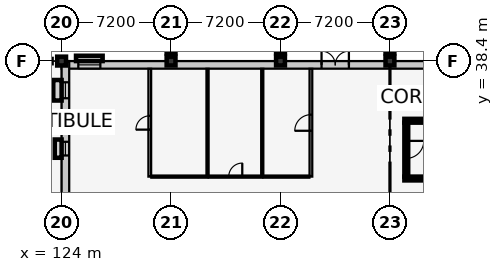
"""IFC4 building model, lengths in metres.
Left out: names, types, materials, properties, quantities, classifications, styles, units other than length and angle.
Written with IfcOpenShell. Run it as: python <this file> out.ifc"""

import sys

from ifc_helpers import new_model, si_unit, direction, frame, frame_2d, origin, origin_2d, place, context, subcontext, project, spatial, rectangle, extrude, element, fill, save


model = new_model("IFC4")
c1 = context("Model", 3, precision=1e-05, world=origin(), true_north=direction((0.0, 1.0)))
c2 = subcontext(c1, "Body", "Model", "MODEL_VIEW")
j1 = project(units=[si_unit("LENGTHUNIT", "METRE"), si_unit("PLANEANGLEUNIT", "RADIAN")], contexts=[c1])
p1 = place(None, origin())
s1 = spatial("IfcSite", under=j1, at=p1, CompositionType="ELEMENT")
p2 = place(p1, origin())
s2 = spatial("IfcBuilding", under=s1, at=p2, CompositionType="ELEMENT")
p3 = place(p2, origin())
s3 = spatial("IfcBuildingStorey", under=s2, at=p3, CompositionType="ELEMENT", Elevation=0.0)
for number, where, z_axis, x_axis in (
    (1, (124.0, 38.4, 0.0), (0.0, 0.0, 1.0), (1.0, 0.0, 0.0)),
    (2, (131.2, 38.4, 0.0), (0.0, 0.0, 1.0), (1.0, 0.0, 0.0)),
    (3, (138.4, 38.4, 0.0), (0.0, 0.0, 1.0), (1.0, 0.0, 0.0)),
    (4, (145.6, 38.4, 0.0), (0.0, 0.0, 1.0), (1.0, 0.0, 0.0)),
    (5, (131.2, 39.2, 0.0), (0.0, 0.0, 1.0), (1.0, 0.0, 0.0)),
    (6, (138.4, 39.2, 0.0), (0.0, 0.0, 1.0), (1.0, 0.0, 0.0)),
    (7, (145.6, 39.2, 0.0), (0.0, 0.0, 1.0), (1.0, 0.0, 0.0)),
):
    element("IfcColumn", number, at=place(p3, frame(where, z_axis=z_axis, x_axis=x_axis)), inside=s3, PredefinedType="COLUMN", context=c2, shape_type="SweptSolid", body=[
        extrude(rectangle(XDim=0.58, YDim=0.58, at=origin_2d()), origin(), (0.0, 0.0, 1.0), 5.4),
    ])
p4 = place(p3, frame((124.0, 38.15, 0.0), z_axis=(0.0, 0.0, 1.0), x_axis=(1.0, 0.0, 0.0)))
e8 = element("IfcWall", 8, at=p4, inside=s3, PredefinedType="SOLIDWALL", context=c2, shape_type="SweptSolid", body=[
    extrude(rectangle(XDim=62.0, YDim=0.5, at=frame_2d((31.0, 0.0))), origin(), (0.0, 0.0, 1.0), 4.275),
])
p5 = place(p4, frame((17.1, 0.0, 0.0)))
e9 = element("IfcOpeningElement", 9, at=p5, cuts=e8, PredefinedType="OPENING", context=c2, shape_type="SweptSolid", body=[
    extrude(rectangle(XDim=1.8, YDim=2.3, at=frame_2d((0.9, 1.15))), frame((0.0, 0.262, 0.0), z_axis=(0.0, -1.0, 0.0), x_axis=(1.0, 0.0, 0.0)), (0.0, 0.0, 1.0), 0.524),
])
p6 = place(p4, frame((1.098, 0.0, 0.9)))
e10 = element("IfcOpeningElement", 10, at=p6, cuts=e8, PredefinedType="OPENING", context=c2, shape_type="SweptSolid", body=[
    extrude(rectangle(XDim=1.45, YDim=1.45, at=frame_2d((0.725, 0.725))), frame((0.0, 0.262, 0.0), z_axis=(0.0, -1.0, 0.0), x_axis=(1.0, 0.0, 0.0)), (0.0, 0.0, 1.0), 0.524),
])
p7 = place(p4, frame((26.853, 0.0, 0.9)))
e11 = element("IfcOpeningElement", 11, at=p7, cuts=e8, PredefinedType="OPENING", context=c2, shape_type="SweptSolid", body=[
    extrude(rectangle(XDim=1.0, YDim=1.75, at=frame_2d((0.5, 0.875))), frame((0.0, 0.262, 0.0), z_axis=(0.0, -1.0, 0.0), x_axis=(1.0, 0.0, 0.0)), (0.0, 0.0, 1.0), 0.524),
])
p8 = place(p4, frame((37.624, 0.0, 0.9)))
e12 = element("IfcOpeningElement", 12, at=p8, cuts=e8, PredefinedType="OPENING", context=c2, shape_type="SweptSolid", body=[
    extrude(rectangle(XDim=1.34, YDim=1.75, at=frame_2d((0.67, 0.875))), frame((0.0, 0.262, 0.0), z_axis=(0.0, -1.0, 0.0), x_axis=(1.0, 0.0, 0.0)), (0.0, 0.0, 1.0), 0.524),
])
p9 = place(p4, frame((41.221, 0.0, 0.9)))
e13 = element("IfcOpeningElement", 13, at=p9, cuts=e8, PredefinedType="OPENING", context=c2, shape_type="SweptSolid", body=[
    extrude(rectangle(XDim=1.44, YDim=1.75, at=frame_2d((0.72, 0.875))), frame((0.0, 0.262, 0.0), z_axis=(0.0, -1.0, 0.0), x_axis=(1.0, 0.0, 0.0)), (0.0, 0.0, 1.0), 0.524),
])
p10 = place(p4, frame((48.785, 0.0, 0.9)))
e14 = element("IfcOpeningElement", 14, at=p10, cuts=e8, PredefinedType="OPENING", context=c2, shape_type="SweptSolid", body=[
    extrude(rectangle(XDim=0.9, YDim=1.35, at=frame_2d((0.45, 0.675))), frame((0.0, 0.262, 0.0), z_axis=(0.0, -1.0, 0.0), x_axis=(1.0, 0.0, 0.0)), (0.0, 0.0, 1.0), 0.524),
])
p11 = place(p4, frame((55.979, 0.0, 0.9)))
e15 = element("IfcOpeningElement", 15, at=p11, cuts=e8, PredefinedType="OPENING", context=c2, shape_type="SweptSolid", body=[
    extrude(rectangle(XDim=1.1, YDim=1.35, at=frame_2d((0.55, 0.675))), frame((0.0, 0.262, 0.0), z_axis=(0.0, -1.0, 0.0), x_axis=(1.0, 0.0, 0.0)), (0.0, 0.0, 1.0), 0.524),
])
p12 = place(p4, frame((59.576, 0.0, 0.9)))
e16 = element("IfcOpeningElement", 16, at=p12, cuts=e8, PredefinedType="OPENING", context=c2, shape_type="SweptSolid", body=[
    extrude(rectangle(XDim=1.2, YDim=1.35, at=frame_2d((0.6, 0.675))), frame((0.0, 0.262, 0.0), z_axis=(0.0, -1.0, 0.0), x_axis=(1.0, 0.0, 0.0)), (0.0, 0.0, 1.0), 0.524),
])
p13 = place(p3, frame((124.25, 0.0, 0.0), z_axis=(0.0, 0.0, 1.0), x_axis=(0.0, 1.0, 0.0)))
e17 = element("IfcWall", 17, at=p13, inside=s3, PredefinedType="SOLIDWALL", context=c2, shape_type="SweptSolid", body=[
    extrude(rectangle(XDim=38.4, YDim=0.5, at=frame_2d((19.2, 0.0))), origin(), (0.0, 0.0, 1.0), 4.275),
])
p14 = place(p13, frame((25.3, 0.0, 0.0)))
e18 = element("IfcOpeningElement", 18, at=p14, cuts=e17, PredefinedType="OPENING", context=c2, shape_type="SweptSolid", body=[
    extrude(rectangle(XDim=2.2, YDim=2.4, at=frame_2d((1.1, 1.2))), frame((0.0, 0.262, 0.0), z_axis=(0.0, -1.0, 0.0), x_axis=(1.0, 0.0, 0.0)), (0.0, 0.0, 1.0), 0.524),
])
p15 = place(p13, frame((1.27, 0.0, 0.9)))
e19 = element("IfcOpeningElement", 19, at=p15, cuts=e17, PredefinedType="OPENING", context=c2, shape_type="SweptSolid", body=[
    extrude(rectangle(XDim=1.3, YDim=1.35, at=frame_2d((0.65, 0.675))), frame((0.0, 0.262, 0.0), z_axis=(0.0, -1.0, 0.0), x_axis=(1.0, 0.0, 0.0)), (0.0, 0.0, 1.0), 0.524),
])
p16 = place(p13, frame((9.125, 0.0, 0.9)))
e20 = element("IfcOpeningElement", 20, at=p16, cuts=e17, PredefinedType="OPENING", context=c2, shape_type="SweptSolid", body=[
    extrude(rectangle(XDim=0.95, YDim=1.45, at=frame_2d((0.475, 0.725))), frame((0.0, 0.262, 0.0), z_axis=(0.0, -1.0, 0.0), x_axis=(1.0, 0.0, 0.0)), (0.0, 0.0, 1.0), 0.524),
])
p17 = place(p13, frame((16.705, 0.0, 0.9)))
e21 = element("IfcOpeningElement", 21, at=p17, cuts=e17, PredefinedType="OPENING", context=c2, shape_type="SweptSolid", body=[
    extrude(rectangle(XDim=1.15, YDim=1.45, at=frame_2d((0.575, 0.725))), frame((0.0, 0.262, 0.0), z_axis=(0.0, -1.0, 0.0), x_axis=(1.0, 0.0, 0.0)), (0.0, 0.0, 1.0), 0.524),
])
p18 = place(p13, frame((32.19, 0.0, 0.9)))
e22 = element("IfcOpeningElement", 22, at=p18, cuts=e17, PredefinedType="OPENING", context=c2, shape_type="SweptSolid", body=[
    extrude(rectangle(XDim=0.9, YDim=1.6, at=frame_2d((0.45, 0.8))), frame((0.0, 0.262, 0.0), z_axis=(0.0, -1.0, 0.0), x_axis=(1.0, 0.0, 0.0)), (0.0, 0.0, 1.0), 0.524),
])
p19 = place(p13, frame((35.955, 0.0, 0.9)))
e23 = element("IfcOpeningElement", 23, at=p19, cuts=e17, PredefinedType="OPENING", context=c2, shape_type="SweptSolid", body=[
    extrude(rectangle(XDim=1.05, YDim=1.6, at=frame_2d((0.525, 0.8))), frame((0.0, 0.262, 0.0), z_axis=(0.0, -1.0, 0.0), x_axis=(1.0, 0.0, 0.0)), (0.0, 0.0, 1.0), 0.524),
])
for number, where, z_axis, x_axis in (
    (24, (146.55, 30.675, 0.0), (0.0, 0.0, 1.0), (1.0, 0.0, 0.0)),
    (25, (155.45, 34.475, 0.0), (0.0, 0.0, 1.0), (-1.0, 0.0, 0.0)),
):
    element("IfcWall", number, at=place(p3, frame(where, z_axis=z_axis, x_axis=x_axis)), inside=s3, PredefinedType="SHEAR", context=c2, shape_type="SweptSolid", body=[
        extrude(rectangle(XDim=8.9, YDim=0.25, at=frame_2d((4.45, 0.0))), origin(), (0.0, 0.0, 1.0), 5.12),
    ])
p20 = place(p3, frame((146.675, 34.35, 0.0), z_axis=(0.0, 0.0, 1.0), x_axis=(0.0, -1.0, 0.0)))
e26 = element("IfcWall", 26, at=p20, inside=s3, PredefinedType="SHEAR", context=c2, shape_type="SweptSolid", body=[
    extrude(rectangle(XDim=3.55, YDim=0.25, at=frame_2d((1.775, 0.0))), origin(), (0.0, 0.0, 1.0), 5.12),
])
p21 = place(p20, frame((1.2, 0.0, 0.0)))
e27 = element("IfcOpeningElement", 27, at=p21, cuts=e26, PredefinedType="OPENING", context=c2, shape_type="SweptSolid", body=[
    extrude(rectangle(XDim=1.15, YDim=2.15, at=frame_2d((0.575, 1.075))), frame((0.0, 0.137, 0.0), z_axis=(0.0, -1.0, 0.0), x_axis=(1.0, 0.0, 0.0)), (0.0, 0.0, 1.0), 0.274),
])
p22 = place(p3, frame((140.4, 30.8, 0.0), z_axis=(0.0, 0.0, 1.0), x_axis=(0.0, 1.0, 0.0)))
e28 = element("IfcWall", 28, at=p22, inside=s3, PredefinedType="PARTITIONING", context=c2, shape_type="SweptSolid", body=[
    extrude(rectangle(XDim=7.09, YDim=0.18, at=frame_2d((3.545, 0.0))), origin(), (0.0, 0.0, 1.0), 5.12),
])
p23 = place(p22, frame((3.015, 0.0, 0.0)))
e29 = element("IfcOpeningElement", 29, at=p23, cuts=e28, PredefinedType="OPENING", context=c2, shape_type="SweptSolid", body=[
    extrude(rectangle(XDim=1.06, YDim=2.1, at=frame_2d((0.53, 1.05))), frame((0.0, 0.102, 0.0), z_axis=(0.0, -1.0, 0.0), x_axis=(1.0, 0.0, 0.0)), (0.0, 0.0, 1.0), 0.204),
])
p24 = place(p3, frame((129.8, 30.8, 0.0), z_axis=(0.0, 0.0, 1.0), x_axis=(0.0, 1.0, 0.0)))
e30 = element("IfcWall", 30, at=p24, inside=s3, PredefinedType="PARTITIONING", context=c2, shape_type="SweptSolid", body=[
    extrude(rectangle(XDim=7.09, YDim=0.18, at=frame_2d((3.545, 0.0))), origin(), (0.0, 0.0, 1.0), 5.12),
])
p25 = place(p24, frame((3.09, 0.0, 0.0)))
e31 = element("IfcOpeningElement", 31, at=p25, cuts=e30, PredefinedType="OPENING", context=c2, shape_type="SweptSolid", body=[
    extrude(rectangle(XDim=0.91, YDim=2.06, at=frame_2d((0.455, 1.03))), frame((0.0, 0.102, 0.0), z_axis=(0.0, -1.0, 0.0), x_axis=(1.0, 0.0, 0.0)), (0.0, 0.0, 1.0), 0.204),
])
p26 = place(p3, frame((129.9, 30.8, 0.0), z_axis=(0.0, 0.0, 1.0), x_axis=(1.0, 0.0, 0.0)))
e32 = element("IfcWall", 32, at=p26, inside=s3, PredefinedType="PARTITIONING", context=c2, shape_type="SweptSolid", body=[
    extrude(rectangle(XDim=3.7, YDim=0.14, at=frame_2d((1.85, 0.0))), origin(), (0.0, 0.0, 1.0), 5.12),
])
p27 = place(p3, frame((133.6, 30.88, 0.0), z_axis=(0.0, 0.0, 1.0), x_axis=(0.0, 1.0, 0.0)))
e33 = element("IfcWall", 33, at=p27, inside=s3, PredefinedType="PARTITIONING", context=c2, shape_type="SweptSolid", body=[
    extrude(rectangle(XDim=7.01, YDim=0.14, at=frame_2d((3.505, 0.0))), origin(), (0.0, 0.0, 1.0), 5.12),
])
p28 = place(p3, frame((133.68, 30.8, 0.0), z_axis=(0.0, 0.0, 1.0), x_axis=(1.0, 0.0, 0.0)))
e34 = element("IfcWall", 34, at=p28, inside=s3, PredefinedType="PARTITIONING", context=c2, shape_type="SweptSolid", body=[
    extrude(rectangle(XDim=3.52, YDim=0.14, at=frame_2d((1.76, 0.0))), origin(), (0.0, 0.0, 1.0), 5.12),
])
p29 = place(p28, frame((1.315, 0.0, 0.0)))
e35 = element("IfcOpeningElement", 35, at=p29, cuts=e34, PredefinedType="OPENING", context=c2, shape_type="SweptSolid", body=[
    extrude(rectangle(XDim=0.89, YDim=2.05, at=frame_2d((0.445, 1.025))), frame((0.0, 0.082, 0.0), z_axis=(0.0, -1.0, 0.0), x_axis=(1.0, 0.0, 0.0)), (0.0, 0.0, 1.0), 0.164),
])
p30 = place(p3, frame((137.2, 30.88, 0.0), z_axis=(0.0, 0.0, 1.0), x_axis=(0.0, 1.0, 0.0)))
e36 = element("IfcWall", 36, at=p30, inside=s3, PredefinedType="PARTITIONING", context=c2, shape_type="SweptSolid", body=[
    extrude(rectangle(XDim=7.01, YDim=0.14, at=frame_2d((3.505, 0.0))), origin(), (0.0, 0.0, 1.0), 5.12),
])
p31 = place(p3, frame((137.28, 30.8, 0.0), z_axis=(0.0, 0.0, 1.0), x_axis=(1.0, 0.0, 0.0)))
e37 = element("IfcWall", 37, at=p31, inside=s3, PredefinedType="PARTITIONING", context=c2, shape_type="SweptSolid", body=[
    extrude(rectangle(XDim=3.02, YDim=0.14, at=frame_2d((1.51, 0.0))), origin(), (0.0, 0.0, 1.0), 5.12),
])
p32 = place(p5, origin())
e38 = element("IfcDoor", 38, at=p32, inside=s3, OperationType="DOUBLE_DOOR_SINGLE_SWING", PredefinedType="DOOR", context=c2, shape_type="SweptSolid", body=[
    extrude(rectangle(XDim=1.8, YDim=2.3, at=frame_2d((0.9, 1.15))), frame((0.0, 0.025, 0.0), z_axis=(0.0, -1.0, 0.0), x_axis=(1.0, 0.0, 0.0)), (0.0, 0.0, 1.0), 0.05),
])
fill(e9, e38)
p33 = place(p6, origin())
e39 = element("IfcWindow", 39, at=p33, inside=s3, PartitioningType="SINGLE_PANEL", PredefinedType="WINDOW", context=c2, shape_type="SweptSolid", body=[
    extrude(rectangle(XDim=1.45, YDim=1.45, at=frame_2d((0.725, 0.725))), frame((0.0, 0.03, 0.0), z_axis=(0.0, -1.0, 0.0), x_axis=(1.0, 0.0, 0.0)), (0.0, 0.0, 1.0), 0.06),
])
fill(e10, e39)
p34 = place(p18, origin())
e40 = element("IfcWindow", 40, at=p34, inside=s3, PartitioningType="SINGLE_PANEL", PredefinedType="WINDOW", context=c2, shape_type="SweptSolid", body=[
    extrude(rectangle(XDim=0.9, YDim=1.6, at=frame_2d((0.45, 0.8))), frame((0.0, 0.03, 0.0), z_axis=(0.0, -1.0, 0.0), x_axis=(1.0, 0.0, 0.0)), (0.0, 0.0, 1.0), 0.06),
])
fill(e22, e40)
p35 = place(p19, origin())
e41 = element("IfcWindow", 41, at=p35, inside=s3, PartitioningType="SINGLE_PANEL", PredefinedType="WINDOW", context=c2, shape_type="SweptSolid", body=[
    extrude(rectangle(XDim=1.05, YDim=1.6, at=frame_2d((0.525, 0.8))), frame((0.0, 0.03, 0.0), z_axis=(0.0, -1.0, 0.0), x_axis=(1.0, 0.0, 0.0)), (0.0, 0.0, 1.0), 0.06),
])
fill(e23, e41)
p36 = place(p21, origin())
e42 = element("IfcDoor", 42, at=p36, inside=s3, OperationType="SINGLE_SWING_LEFT", PredefinedType="DOOR", context=c2, shape_type="SweptSolid", body=[
    extrude(rectangle(XDim=1.15, YDim=2.15, at=frame_2d((0.575, 1.075))), frame((0.0, 0.025, 0.0), z_axis=(0.0, -1.0, 0.0), x_axis=(1.0, 0.0, 0.0)), (0.0, 0.0, 1.0), 0.05),
])
fill(e27, e42)
p37 = place(p25, origin())
e43 = element("IfcDoor", 43, at=p37, inside=s3, OperationType="SINGLE_SWING_LEFT", PredefinedType="DOOR", context=c2, shape_type="SweptSolid", body=[
    extrude(rectangle(XDim=0.91, YDim=2.06, at=frame_2d((0.455, 1.03))), frame((0.0, 0.025, 0.0), z_axis=(0.0, -1.0, 0.0), x_axis=(1.0, 0.0, 0.0)), (0.0, 0.0, 1.0), 0.05),
])
fill(e31, e43)
p38 = place(p29, origin())
e44 = element("IfcDoor", 44, at=p38, inside=s3, OperationType="SINGLE_SWING_RIGHT", PredefinedType="DOOR", context=c2, shape_type="SweptSolid", body=[
    extrude(rectangle(XDim=0.89, YDim=2.05, at=frame_2d((0.445, 1.025))), frame((0.0, 0.025, 0.0), z_axis=(0.0, -1.0, 0.0), x_axis=(1.0, 0.0, 0.0)), (0.0, 0.0, 1.0), 0.05),
])
fill(e35, e44)
p39 = place(p23, origin())
e45 = element("IfcDoor", 45, at=p39, inside=s3, OperationType="SINGLE_SWING_LEFT", PredefinedType="DOOR", context=c2, shape_type="SweptSolid", body=[
    extrude(rectangle(XDim=1.06, YDim=2.1, at=frame_2d((0.53, 1.05))), frame((0.0, 0.025, 0.0), z_axis=(0.0, -1.0, 0.0), x_axis=(1.0, 0.0, 0.0)), (0.0, 0.0, 1.0), 0.05),
])
fill(e29, e45)
save(model, sys.argv[1])
